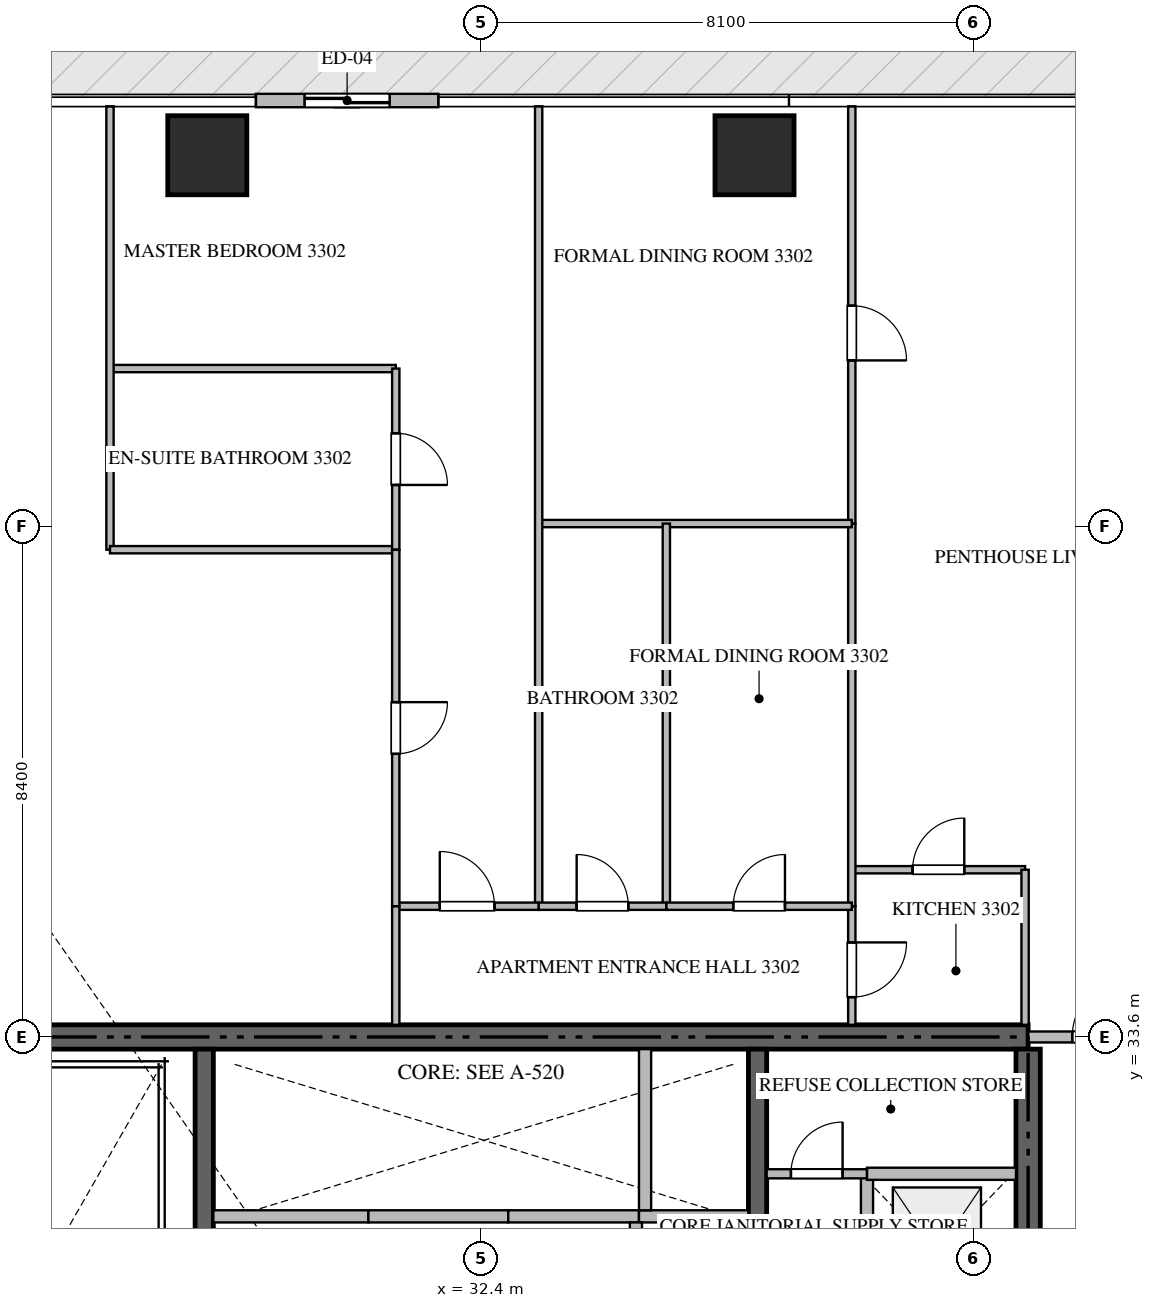
"""IFC4 building model, lengths in metres.
Left out: names, types, materials, properties, quantities, classifications, styles, units other than length and angle.
Written with IfcOpenShell. Run it as: python <this file> out.ifc"""

import sys

from ifc_helpers import new_model, si_unit, direction, frame, frame_2d, origin, origin_2d, place, context, subcontext, project, spatial, rectangle, extrude, source, transform, mapped, element, fill, save


model = new_model("IFC4")
c1 = context("Model", 3, precision=1e-05, world=origin(), true_north=direction((0.0, 1.0)))
c2 = subcontext(c1, "Body", "Model", "MODEL_VIEW")
j1 = project(units=[si_unit("LENGTHUNIT", "METRE"), si_unit("PLANEANGLEUNIT", "RADIAN")], contexts=[c1])
p1 = place(None, origin())
s1 = spatial("IfcSite", under=j1, at=p1, CompositionType="ELEMENT")
p2 = place(p1, origin())
s2 = spatial("IfcBuilding", under=s1, at=p2, CompositionType="ELEMENT")
p3 = place(p2, frame((0.0, 0.0, 135.15)))
s3 = spatial("IfcBuildingStorey", under=s2, at=p3, CompositionType="ELEMENT", Elevation=135.15)
p4 = place(p3, frame((41.4, 33.6, -0.26), z_axis=(0.0, 0.0, 1.0), x_axis=(-1.0, 0.0, 0.0)))
e1 = element("IfcWall", 1, at=p4, inside=s3, PredefinedType="SHEAR", context=c2, shape_type="SweptSolid", body=[
    extrude(rectangle(XDim=18.0, YDim=0.4, at=frame_2d((9.0, 0.0))), origin(), (0.0, 0.0, 1.0), 3.748),
])
p5 = place(p3, frame((41.4, 27.75, -0.26), z_axis=(0.0, 0.0, 1.0), x_axis=(0.0, 1.0, 0.0)))
e2 = element("IfcWall", 2, at=p5, inside=s3, PredefinedType="SHEAR", context=c2, shape_type="SweptSolid", body=[
    extrude(rectangle(XDim=5.65, YDim=0.4, at=frame_2d((2.825, 0.0))), origin(), (0.0, 0.0, 1.0), 3.748),
])
p6 = place(p3, frame((27.85, 23.55, -0.26), z_axis=(0.0, 0.0, 1.0), x_axis=(0.0, 1.0, 0.0)))
e3 = element("IfcWall", 3, at=p6, inside=s3, PredefinedType="SHEAR", context=c2, shape_type="SweptSolid", body=[
    extrude(rectangle(XDim=9.85, YDim=0.3, at=frame_2d((4.925, 0.0))), origin(), (0.0, 0.0, 1.0), 3.748),
])
p7 = place(p3, frame((36.95, 27.05, -0.26), z_axis=(0.0, 0.0, 1.0), x_axis=(0.0, 1.0, 0.0)))
e4 = element("IfcWall", 4, at=p7, inside=s3, PredefinedType="SHEAR", context=c2, shape_type="SweptSolid", body=[
    extrude(rectangle(XDim=6.35, YDim=0.3, at=frame_2d((3.175, 0.0))), origin(), (0.0, 0.0, 1.0), 3.748),
])
m1 = source(origin(), c2, "Body", "SweptSolid", [
    extrude(rectangle(XDim=1.3, YDim=1.3, at=origin_2d()), origin(), (0.0, 0.0, 1.0), 3.75),
])
for number, where, z_axis, x_axis in (
    (5, (27.9, 48.1, -0.26), (0.0, 0.0, 1.0), (1.0, 0.0, 0.0)),
    (6, (36.9, 48.1, -0.26), (0.0, 0.0, 1.0), (1.0, 0.0, 0.0)),
):
    element("IfcColumn", number, at=place(p3, frame(where, z_axis=z_axis, x_axis=x_axis)), inside=s3, PredefinedType="COLUMN", context=c2, shape_type="MappedRepresentation", body=[
        mapped(m1, transform((0.0, 0.0, 0.0), scale=1.0)),
    ])
p8 = place(p3, frame((31.7, 49.0, 0.0), z_axis=(0.0, 0.0, 1.0), x_axis=(-1.0, 0.0, 0.0)))
e7 = element("IfcWall", 7, at=p8, inside=s3, PredefinedType="ELEMENTEDWALL", context=c2, shape_type="SweptSolid", body=[
    extrude(rectangle(XDim=3.0, YDim=0.22, at=frame_2d((1.5, 0.0))), origin(), (0.0, 0.0, 1.0), 3.475),
])
p9 = place(p8, frame((0.8, 0.0, 0.0)))
e8 = element("IfcOpeningElement", 8, at=p9, cuts=e7, PredefinedType="OPENING", context=c2, shape_type="SweptSolid", body=[
    extrude(rectangle(XDim=1.4, YDim=2.25, at=frame_2d((0.7, 1.125))), frame((0.0, 0.12, 0.0), z_axis=(0.0, -1.0, 0.0), x_axis=(1.0, 0.0, 0.0)), (0.0, 0.0, 1.0), 0.24),
])
p10 = place(p3, frame((28.0, 30.65, 0.0), z_axis=(0.0, 0.0, 1.0), x_axis=(1.0, 0.0, 0.0)))
e9 = element("IfcWall", 9, at=p10, inside=s3, PredefinedType="STANDARD", context=c2, shape_type="SweptSolid", body=[
    extrude(rectangle(XDim=2.55, YDim=0.2, at=frame_2d((1.275, 0.0))), origin(), (0.0, 0.0, 1.0), 3.49),
])
p11 = place(p3, frame((30.55, 30.65, 0.0), z_axis=(0.0, 0.0, 1.0), x_axis=(1.0, 0.0, 0.0)))
e10 = element("IfcWall", 10, at=p11, inside=s3, PredefinedType="STANDARD", context=c2, shape_type="SweptSolid", body=[
    extrude(rectangle(XDim=2.3, YDim=0.2, at=frame_2d((1.15, 0.0))), origin(), (0.0, 0.0, 1.0), 3.49),
])
p12 = place(p3, frame((32.85, 30.65, 0.0), z_axis=(0.0, 0.0, 1.0), x_axis=(1.0, 0.0, 0.0)))
e11 = element("IfcWall", 11, at=p12, inside=s3, PredefinedType="STANDARD", context=c2, shape_type="SweptSolid", body=[
    extrude(rectangle(XDim=2.15, YDim=0.2, at=frame_2d((1.075, 0.0))), origin(), (0.0, 0.0, 1.0), 3.49),
])
p13 = place(p3, frame((35.0, 30.65, 0.0), z_axis=(0.0, 0.0, 1.0), x_axis=(1.0, 0.0, 0.0)))
e12 = element("IfcWall", 12, at=p13, inside=s3, PredefinedType="STANDARD", context=c2, shape_type="SweptSolid", body=[
    extrude(rectangle(XDim=1.8, YDim=0.2, at=frame_2d((0.9, 0.0))), origin(), (0.0, 0.0, 1.0), 3.49),
])
p14 = place(p3, frame((35.1, 30.75, 0.0), z_axis=(0.0, 0.0, 1.0), x_axis=(0.0, 1.0, 0.0)))
e13 = element("IfcWall", 13, at=p14, inside=s3, PredefinedType="STANDARD", context=c2, shape_type="SweptSolid", body=[
    extrude(rectangle(XDim=2.65, YDim=0.2, at=frame_2d((1.325, 0.0))), origin(), (0.0, 0.0, 1.0), 3.49),
])
p15 = place(p3, frame((38.75, 28.85, 0.0), z_axis=(0.0, 0.0, 1.0), x_axis=(0.0, 1.0, 0.0)))
e14 = element("IfcWall", 14, at=p15, inside=s3, PredefinedType="STANDARD", context=c2, shape_type="SweptSolid", body=[
    extrude(rectangle(XDim=2.5, YDim=0.2, at=frame_2d((1.25, 0.0))), origin(), (0.0, 0.0, 1.0), 3.49),
])
p16 = place(p3, frame((38.75, 31.35, 0.0), z_axis=(0.0, 0.0, 1.0), x_axis=(1.0, 0.0, 0.0)))
e15 = element("IfcWall", 15, at=p16, inside=s3, PredefinedType="STANDARD", context=c2, shape_type="SweptSolid", body=[
    extrude(rectangle(XDim=2.45, YDim=0.2, at=frame_2d((1.225, 0.0))), origin(), (0.0, 0.0, 1.0), 3.49),
])
p17 = place(p3, frame((37.1, 31.35, 0.0), z_axis=(0.0, 0.0, 1.0), x_axis=(1.0, 0.0, 0.0)))
e16 = element("IfcWall", 16, at=p17, inside=s3, PredefinedType="PARTITIONING", context=c2, shape_type="SweptSolid", body=[
    extrude(rectangle(XDim=1.648, YDim=0.15, at=frame_2d((0.824, 0.0))), origin(), (0.0, 0.0, 1.0), 3.49),
])
p18 = place(p17, frame((0.399, 0.0, 0.0)))
e17 = element("IfcOpeningElement", 17, at=p18, cuts=e16, PredefinedType="OPENING", context=c2, shape_type="SweptSolid", body=[
    extrude(rectangle(XDim=0.85, YDim=2.1, at=frame_2d((0.425, 1.05))), frame((0.0, 0.085, 0.0), z_axis=(0.0, -1.0, 0.0), x_axis=(1.0, 0.0, 0.0)), (0.0, 0.0, 1.0), 0.17),
])
p19 = place(p3, frame((34.95, 28.702, 0.0), z_axis=(0.0, 0.0, 1.0), x_axis=(0.0, 1.0, 0.0)))
e18 = element("IfcWall", 18, at=p19, inside=s3, PredefinedType="STANDARD", context=c2, shape_type="SweptSolid", body=[
    extrude(rectangle(XDim=1.848, YDim=0.2, at=frame_2d((0.924, 0.0))), origin(), (0.0, 0.0, 1.0), 3.49),
])
p20 = place(p19, frame((0.499, 0.0, 0.0)))
e19 = element("IfcOpeningElement", 19, at=p20, cuts=e18, PredefinedType="OPENING", context=c2, shape_type="SweptSolid", body=[
    extrude(rectangle(XDim=0.85, YDim=2.1, at=frame_2d((0.425, 1.05))), frame((0.0, 0.11, 0.0), z_axis=(0.0, -1.0, 0.0), x_axis=(1.0, 0.0, 0.0)), (0.0, 0.0, 1.0), 0.22),
])
p21 = place(p3, frame((41.402, 33.6, 0.0), z_axis=(0.0, 0.0, 1.0), x_axis=(1.0, 0.0, 0.0)))
e20 = element("IfcWall", 20, at=p21, inside=s3, PredefinedType="PARTITIONING", context=c2, shape_type="SweptSolid", body=[
    extrude(rectangle(XDim=2.446, YDim=0.18, at=frame_2d((1.223, 0.0))), origin(), (0.0, 0.0, 1.0), 3.49),
])
p22 = place(p21, frame((0.723, 0.0, 0.0)))
e21 = element("IfcOpeningElement", 21, at=p22, cuts=e20, PredefinedType="OPENING", context=c2, shape_type="SweptSolid", body=[
    extrude(rectangle(XDim=1.0, YDim=2.15, at=frame_2d((0.5, 1.075))), frame((0.0, 0.1, 0.0), z_axis=(0.0, -1.0, 0.0), x_axis=(1.0, 0.0, 0.0)), (0.0, 0.0, 1.0), 0.2),
])
p23 = place(p3, frame((38.5, 36.35, 0.0), z_axis=(0.0, 0.0, 1.0), x_axis=(1.0, 0.0, 0.0)))
e22 = element("IfcWall", 22, at=p23, inside=s3, PredefinedType="PARTITIONING", context=c2, shape_type="SweptSolid", body=[
    extrude(rectangle(XDim=2.85, YDim=0.12, at=frame_2d((1.425, 0.0))), origin(), (0.0, 0.0, 1.0), 3.49),
])
p24 = place(p23, frame((1.0, 0.0, 0.0)))
e23 = element("IfcOpeningElement", 23, at=p24, cuts=e22, PredefinedType="OPENING", context=c2, shape_type="SweptSolid", body=[
    extrude(rectangle(XDim=0.85, YDim=2.1, at=frame_2d((0.425, 1.05))), frame((0.0, 0.07, 0.0), z_axis=(0.0, -1.0, 0.0), x_axis=(1.0, 0.0, 0.0)), (0.0, 0.0, 1.0), 0.14),
])
p25 = place(p3, frame((41.35, 36.35, 0.0), z_axis=(0.0, 0.0, 1.0), x_axis=(0.0, -1.0, 0.0)))
e24 = element("IfcWall", 24, at=p25, inside=s3, PredefinedType="PARTITIONING", context=c2, shape_type="SweptSolid", body=[
    extrude(rectangle(XDim=2.55, YDim=0.12, at=frame_2d((1.275, 0.0))), origin(), (0.0, 0.0, 1.0), 3.49),
])
p26 = place(p3, frame((38.5, 35.75, 0.0), z_axis=(0.0, 0.0, 1.0), x_axis=(0.0, -1.0, 0.0)))
e25 = element("IfcWall", 25, at=p26, inside=s3, PredefinedType="PARTITIONING", context=c2, shape_type="SweptSolid", body=[
    extrude(rectangle(XDim=1.95, YDim=0.12, at=frame_2d((0.975, 0.0))), origin(), (0.0, 0.0, 1.0), 3.49),
])
p27 = place(p26, frame((0.595, 0.0, 0.0)))
e26 = element("IfcOpeningElement", 26, at=p27, cuts=e25, PredefinedType="OPENING", context=c2, shape_type="SweptSolid", body=[
    extrude(rectangle(XDim=0.9, YDim=2.1, at=frame_2d((0.45, 1.05))), frame((0.0, 0.07, 0.0), z_axis=(0.0, -1.0, 0.0), x_axis=(1.0, 0.0, 0.0)), (0.0, 0.0, 1.0), 0.14),
])
p28 = place(p3, frame((38.5, 48.905, 0.0), z_axis=(0.0, 0.0, 1.0), x_axis=(0.0, -1.0, 0.0)))
e27 = element("IfcWall", 27, at=p28, inside=s3, PredefinedType="PARTITIONING", context=c2, shape_type="SweptSolid", body=[
    extrude(rectangle(XDim=6.862, YDim=0.12, at=frame_2d((3.431, 0.0))), origin(), (0.0, 0.0, 1.0), 3.49),
])
p29 = place(p28, frame((3.279, 0.0, 0.0)))
e28 = element("IfcOpeningElement", 28, at=p29, cuts=e27, PredefinedType="OPENING", context=c2, shape_type="SweptSolid", body=[
    extrude(rectangle(XDim=0.9, YDim=2.1, at=frame_2d((0.45, 1.05))), frame((0.0, 0.07, 0.0), z_axis=(0.0, -1.0, 0.0), x_axis=(1.0, 0.0, 0.0)), (0.0, 0.0, 1.0), 0.14),
])
p30 = place(p3, frame((38.5, 42.041, 0.0), z_axis=(0.0, 0.0, 1.0), x_axis=(0.0, -1.0, 0.0)))
e29 = element("IfcWall", 29, at=p30, inside=s3, PredefinedType="PARTITIONING", context=c2, shape_type="SweptSolid", body=[
    extrude(rectangle(XDim=6.289, YDim=0.12, at=frame_2d((3.145, 0.0))), origin(), (0.0, 0.0, 1.0), 3.49),
])
p31 = place(p3, frame((33.35, 42.043, 0.0), z_axis=(0.0, 0.0, 1.0), x_axis=(1.0, 0.0, 0.0)))
e30 = element("IfcWall", 30, at=p31, inside=s3, PredefinedType="PARTITIONING", context=c2, shape_type="SweptSolid", body=[
    extrude(rectangle(XDim=5.15, YDim=0.12, at=frame_2d((2.575, 0.0))), origin(), (0.0, 0.0, 1.0), 3.49),
])
p32 = place(p3, frame((33.35, 48.905, 0.0), z_axis=(0.0, 0.0, 1.0), x_axis=(0.0, -1.0, 0.0)))
e31 = element("IfcWall", 31, at=p32, inside=s3, PredefinedType="PARTITIONING", context=c2, shape_type="SweptSolid", body=[
    extrude(rectangle(XDim=13.155, YDim=0.12, at=frame_2d((6.578, 0.0))), origin(), (0.0, 0.0, 1.0), 3.49),
])
p33 = place(p3, frame((35.45, 42.043, 0.0), z_axis=(0.0, 0.0, 1.0), x_axis=(0.0, -1.0, 0.0)))
e32 = element("IfcWall", 32, at=p33, inside=s3, PredefinedType="PARTITIONING", context=c2, shape_type="SweptSolid", body=[
    extrude(rectangle(XDim=6.293, YDim=0.12, at=frame_2d((3.146, 0.0))), origin(), (0.0, 0.0, 1.0), 3.49),
])
p34 = place(p3, frame((33.35, 35.75, 0.0), z_axis=(0.0, 0.0, 1.0), x_axis=(1.0, 0.0, 0.0)))
e33 = element("IfcWall", 33, at=p34, inside=s3, PredefinedType="PARTITIONING", context=c2, shape_type="SweptSolid", body=[
    extrude(rectangle(XDim=2.1, YDim=0.12, at=frame_2d((1.05, 0.0))), origin(), (0.0, 0.0, 1.0), 3.49),
])
p35 = place(p34, frame((0.625, 0.0, 0.0)))
e34 = element("IfcOpeningElement", 34, at=p35, cuts=e33, PredefinedType="OPENING", context=c2, shape_type="SweptSolid", body=[
    extrude(rectangle(XDim=0.85, YDim=2.1, at=frame_2d((0.425, 1.05))), frame((0.0, 0.07, 0.0), z_axis=(0.0, -1.0, 0.0), x_axis=(1.0, 0.0, 0.0)), (0.0, 0.0, 1.0), 0.14),
])
p36 = place(p3, frame((35.452, 35.75, 0.0), z_axis=(0.0, 0.0, 1.0), x_axis=(1.0, 0.0, 0.0)))
e35 = element("IfcWall", 35, at=p36, inside=s3, PredefinedType="PARTITIONING", context=c2, shape_type="SweptSolid", body=[
    extrude(rectangle(XDim=3.048, YDim=0.12, at=frame_2d((1.524, 0.0))), origin(), (0.0, 0.0, 1.0), 3.49),
])
p37 = place(p36, frame((1.099, 0.0, 0.0)))
e36 = element("IfcOpeningElement", 36, at=p37, cuts=e35, PredefinedType="OPENING", context=c2, shape_type="SweptSolid", body=[
    extrude(rectangle(XDim=0.85, YDim=2.1, at=frame_2d((0.425, 1.05))), frame((0.0, 0.07, 0.0), z_axis=(0.0, -1.0, 0.0), x_axis=(1.0, 0.0, 0.0)), (0.0, 0.0, 1.0), 0.14),
])
p38 = place(p3, frame((31.0, 35.75, 0.0), z_axis=(0.0, 0.0, 1.0), x_axis=(1.0, 0.0, 0.0)))
e37 = element("IfcWall", 37, at=p38, inside=s3, PredefinedType="PARTITIONING", context=c2, shape_type="SweptSolid", body=[
    extrude(rectangle(XDim=2.348, YDim=0.12, at=frame_2d((1.174, 0.0))), origin(), (0.0, 0.0, 1.0), 3.49),
])
p39 = place(p38, frame((0.724, 0.0, 0.0)))
e38 = element("IfcOpeningElement", 38, at=p39, cuts=e37, PredefinedType="OPENING", context=c2, shape_type="SweptSolid", body=[
    extrude(rectangle(XDim=0.9, YDim=2.1, at=frame_2d((0.45, 1.05))), frame((0.0, 0.07, 0.0), z_axis=(0.0, -1.0, 0.0), x_axis=(1.0, 0.0, 0.0)), (0.0, 0.0, 1.0), 0.14),
])
p40 = place(p3, frame((26.3, 44.592, 0.0), z_axis=(0.0, 0.0, 1.0), x_axis=(1.0, 0.0, 0.0)))
e39 = element("IfcWall", 39, at=p40, inside=s3, PredefinedType="PARTITIONING", context=c2, shape_type="SweptSolid", body=[
    extrude(rectangle(XDim=4.7, YDim=0.12, at=frame_2d((2.35, 0.0))), origin(), (0.0, 0.0, 1.0), 3.49),
])
p41 = place(p3, frame((26.3, 48.905, 0.0), z_axis=(0.0, 0.0, 1.0), x_axis=(0.0, -1.0, 0.0)))
e40 = element("IfcWall", 40, at=p41, inside=s3, PredefinedType="PARTITIONING", context=c2, shape_type="SweptSolid", body=[
    extrude(rectangle(XDim=7.292, YDim=0.12, at=frame_2d((3.646, 0.0))), origin(), (0.0, 0.0, 1.0), 3.49),
])
p42 = place(p3, frame((26.3, 41.613, 0.0), z_axis=(0.0, 0.0, 1.0), x_axis=(1.0, 0.0, 0.0)))
e41 = element("IfcWall", 41, at=p42, inside=s3, PredefinedType="PARTITIONING", context=c2, shape_type="SweptSolid", body=[
    extrude(rectangle(XDim=4.7, YDim=0.12, at=frame_2d((2.35, 0.0))), origin(), (0.0, 0.0, 1.0), 3.49),
])
p43 = place(p3, frame((31.0, 44.592, 0.0), z_axis=(0.0, 0.0, 1.0), x_axis=(0.0, -1.0, 0.0)))
e42 = element("IfcWall", 42, at=p43, inside=s3, PredefinedType="PARTITIONING", context=c2, shape_type="SweptSolid", body=[
    extrude(rectangle(XDim=2.979, YDim=0.12, at=frame_2d((1.49, 0.0))), origin(), (0.0, 0.0, 1.0), 3.49),
])
p44 = place(p43, frame((1.064, 0.0, 0.0)))
e43 = element("IfcOpeningElement", 43, at=p44, cuts=e42, PredefinedType="OPENING", context=c2, shape_type="SweptSolid", body=[
    extrude(rectangle(XDim=0.85, YDim=2.1, at=frame_2d((0.425, 1.05))), frame((0.0, 0.07, 0.0), z_axis=(0.0, -1.0, 0.0), x_axis=(1.0, 0.0, 0.0)), (0.0, 0.0, 1.0), 0.14),
])
p45 = place(p3, frame((31.0, 41.611, 0.0), z_axis=(0.0, 0.0, 1.0), x_axis=(0.0, -1.0, 0.0)))
e44 = element("IfcWall", 44, at=p45, inside=s3, PredefinedType="PARTITIONING", context=c2, shape_type="SweptSolid", body=[
    extrude(rectangle(XDim=5.861, YDim=0.12, at=frame_2d((2.931, 0.0))), origin(), (0.0, 0.0, 1.0), 3.49),
])
p46 = place(p45, frame((2.505, 0.0, 0.0)))
e45 = element("IfcOpeningElement", 45, at=p46, cuts=e44, PredefinedType="OPENING", context=c2, shape_type="SweptSolid", body=[
    extrude(rectangle(XDim=0.85, YDim=2.1, at=frame_2d((0.425, 1.05))), frame((0.0, 0.07, 0.0), z_axis=(0.0, -1.0, 0.0), x_axis=(1.0, 0.0, 0.0)), (0.0, 0.0, 1.0), 0.14),
])
p47 = place(p3, frame((31.0, 35.748, 0.0), z_axis=(0.0, 0.0, 1.0), x_axis=(0.0, -1.0, 0.0)))
e46 = element("IfcWall", 46, at=p47, inside=s3, PredefinedType="PARTITIONING", context=c2, shape_type="SweptSolid", body=[
    extrude(rectangle(XDim=1.948, YDim=0.12, at=frame_2d((0.974, 0.0))), origin(), (0.0, 0.0, 1.0), 3.49),
])
m2 = source(origin(), c2, "Body", "SweptSolid", [
    extrude(rectangle(XDim=1.4, YDim=2.25, at=frame_2d((0.7, 1.125))), frame((0.0, 0.025, 0.0), z_axis=(0.0, -1.0, 0.0), x_axis=(1.0, 0.0, 0.0)), (0.0, 0.0, 1.0), 0.05),
])
p48 = place(p9, origin())
e47 = element("IfcDoor", 47, at=p48, inside=s3, OperationType="SLIDING_TO_LEFT", PredefinedType="DOOR", context=c2, shape_type="MappedRepresentation", body=[
    mapped(m2, transform((0.0, 0.0, 0.0), scale=1.0)),
])
fill(e8, e47)
m3 = source(origin(), c2, "Body", "SweptSolid", [
    extrude(rectangle(XDim=0.85, YDim=2.1, at=frame_2d((0.425, 1.05))), frame((0.0, 0.025, 0.0), z_axis=(0.0, -1.0, 0.0), x_axis=(1.0, 0.0, 0.0)), (0.0, 0.0, 1.0), 0.05),
])
p49 = place(p18, origin())
e48 = element("IfcDoor", 48, at=p49, inside=s3, OperationType="SINGLE_SWING_RIGHT", PredefinedType="DOOR", context=c2, shape_type="MappedRepresentation", body=[
    mapped(m3, transform((0.0, 0.0, 0.0), scale=1.0)),
])
fill(e17, e48)
m4 = source(origin(), c2, "Body", "SweptSolid", [
    extrude(rectangle(XDim=1.0, YDim=2.15, at=frame_2d((0.5, 1.075))), frame((0.0, 0.025, 0.0), z_axis=(0.0, -1.0, 0.0), x_axis=(1.0, 0.0, 0.0)), (0.0, 0.0, 1.0), 0.05),
])
p50 = place(p22, origin())
e49 = element("IfcDoor", 49, at=p50, inside=s3, OperationType="SINGLE_SWING_RIGHT", PredefinedType="DOOR", context=c2, shape_type="MappedRepresentation", body=[
    mapped(m4, transform((0.0, 0.0, 0.0), scale=1.0)),
])
fill(e21, e49)
p51 = place(p24, origin())
e50 = element("IfcDoor", 50, at=p51, inside=s3, OperationType="SINGLE_SWING_RIGHT", PredefinedType="DOOR", context=c2, shape_type="MappedRepresentation", body=[
    mapped(m3, transform((0.0, 0.0, 0.0), scale=1.0)),
])
fill(e23, e50)
m5 = source(origin(), c2, "Body", "SweptSolid", [
    extrude(rectangle(XDim=0.9, YDim=2.1, at=frame_2d((0.45, 1.05))), frame((0.0, 0.025, 0.0), z_axis=(0.0, -1.0, 0.0), x_axis=(1.0, 0.0, 0.0)), (0.0, 0.0, 1.0), 0.05),
])
p52 = place(p27, origin())
e51 = element("IfcDoor", 51, at=p52, inside=s3, OperationType="SINGLE_SWING_LEFT", PredefinedType="DOOR", context=c2, shape_type="MappedRepresentation", body=[
    mapped(m5, transform((0.0, 0.0, 0.0), scale=1.0)),
])
fill(e26, e51)
p53 = place(p29, origin())
e52 = element("IfcDoor", 52, at=p53, inside=s3, OperationType="SINGLE_SWING_RIGHT", PredefinedType="DOOR", context=c2, shape_type="MappedRepresentation", body=[
    mapped(m5, transform((0.0, 0.0, 0.0), scale=1.0)),
])
fill(e28, e52)
p54 = place(p35, origin())
e53 = element("IfcDoor", 53, at=p54, inside=s3, OperationType="SINGLE_SWING_LEFT", PredefinedType="DOOR", context=c2, shape_type="MappedRepresentation", body=[
    mapped(m3, transform((0.0, 0.0, 0.0), scale=1.0)),
])
fill(e34, e53)
p55 = place(p37, origin())
e54 = element("IfcDoor", 54, at=p55, inside=s3, OperationType="SINGLE_SWING_RIGHT", PredefinedType="DOOR", context=c2, shape_type="MappedRepresentation", body=[
    mapped(m3, transform((0.0, 0.0, 0.0), scale=1.0)),
])
fill(e36, e54)
p56 = place(p39, origin())
e55 = element("IfcDoor", 55, at=p56, inside=s3, OperationType="SINGLE_SWING_LEFT", PredefinedType="DOOR", context=c2, shape_type="MappedRepresentation", body=[
    mapped(m5, transform((0.0, 0.0, 0.0), scale=1.0)),
])
fill(e38, e55)
p57 = place(p44, origin())
e56 = element("IfcDoor", 56, at=p57, inside=s3, OperationType="SINGLE_SWING_RIGHT", PredefinedType="DOOR", context=c2, shape_type="MappedRepresentation", body=[
    mapped(m3, transform((0.0, 0.0, 0.0), scale=1.0)),
])
fill(e43, e56)
p58 = place(p46, origin())
e57 = element("IfcDoor", 57, at=p58, inside=s3, OperationType="SINGLE_SWING_LEFT", PredefinedType="DOOR", context=c2, shape_type="MappedRepresentation", body=[
    mapped(m3, transform((0.0, 0.0, 0.0), scale=1.0)),
])
fill(e45, e57)
save(model, sys.argv[1])
